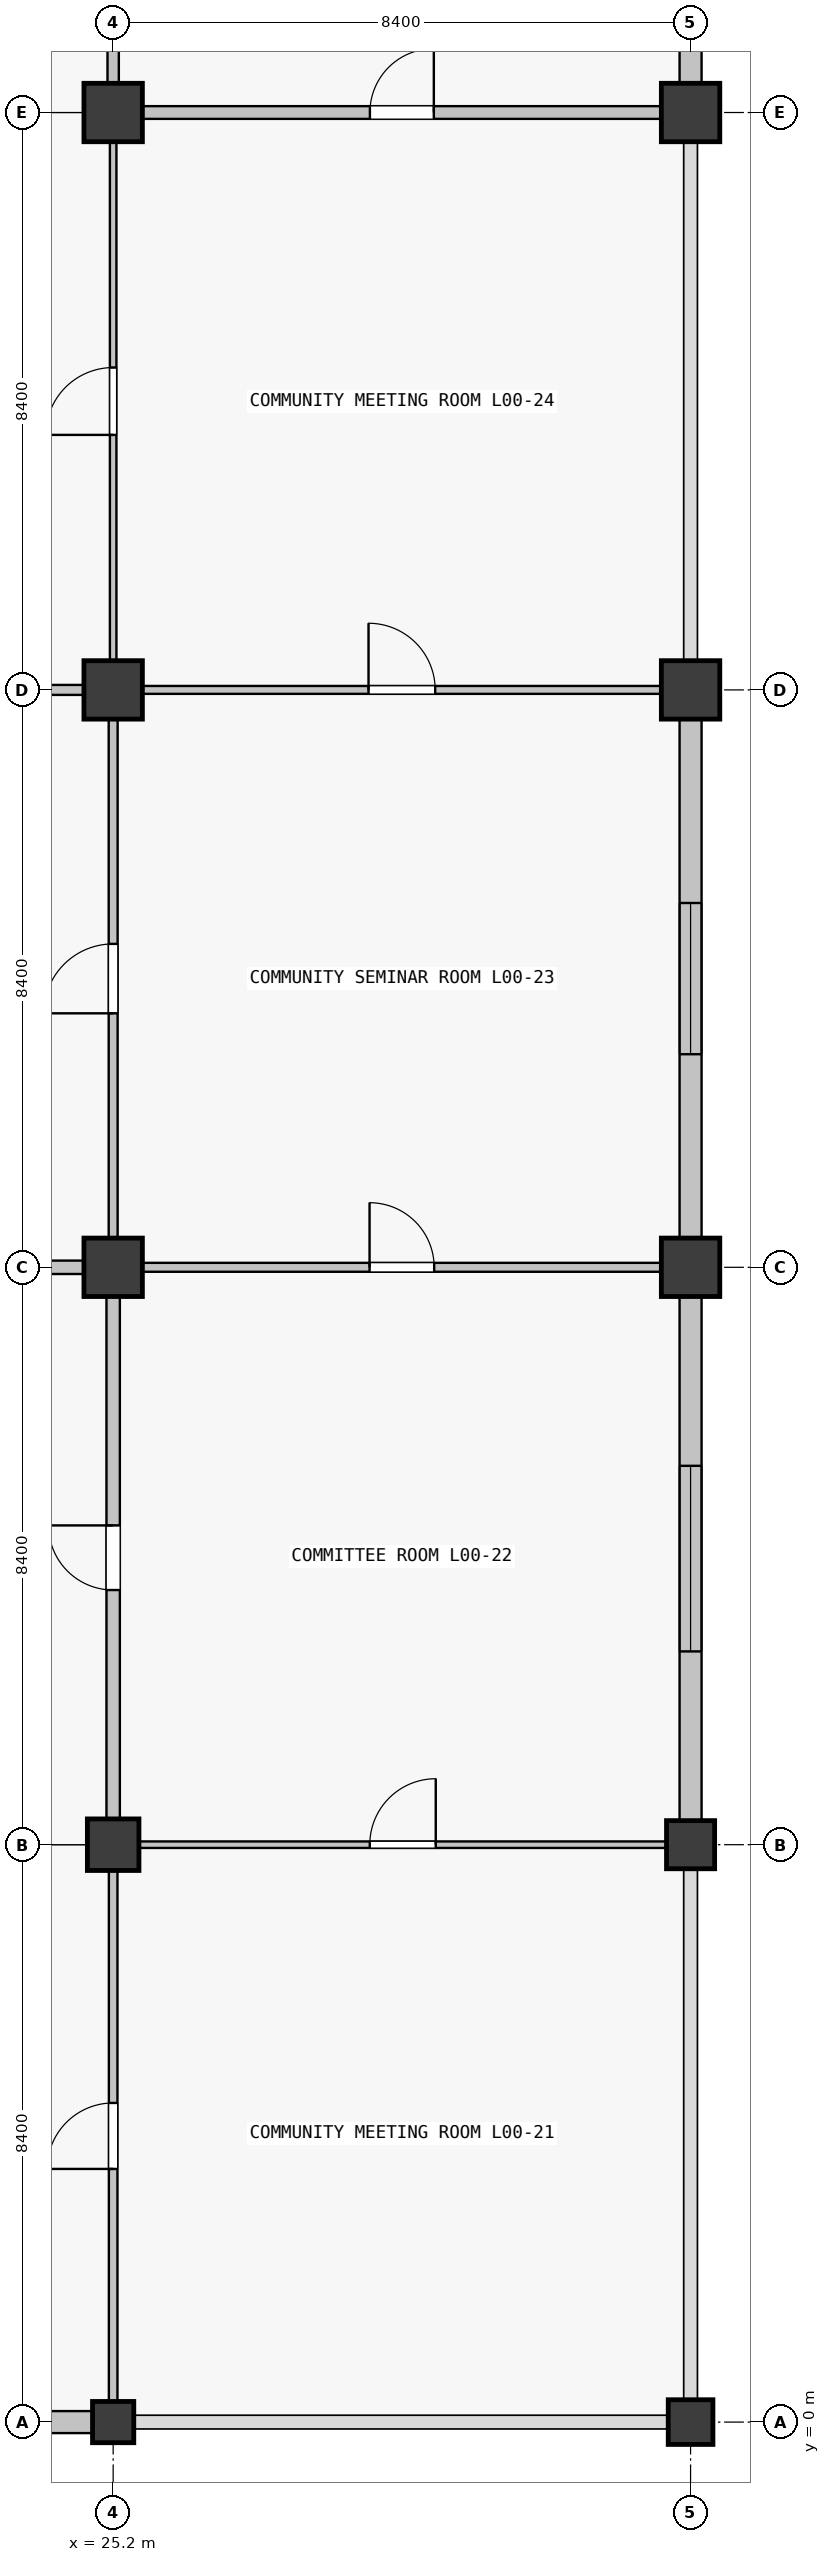
"""IFC4 building model, lengths in metres.
Left out: names, types, materials, properties, quantities, classifications, styles, units other than length and angle.
Written with IfcOpenShell. Run it as: python <this file> out.ifc"""

import sys

from ifc_helpers import new_model, si_unit, direction, frame, frame_2d, origin, origin_2d, place, context, subcontext, project, spatial, rectangle, extrude, element, fill, save


model = new_model("IFC4")
c1 = context("Model", 3, precision=1e-05, world=origin(), true_north=direction((0.0, 1.0)))
c2 = subcontext(c1, "Body", "Model", "MODEL_VIEW")
j1 = project(units=[si_unit("LENGTHUNIT", "METRE"), si_unit("PLANEANGLEUNIT", "RADIAN")], contexts=[c1])
p1 = place(None, origin())
s1 = spatial("IfcSite", under=j1, at=p1, CompositionType="ELEMENT")
p2 = place(p1, origin())
s2 = spatial("IfcBuilding", under=s1, at=p2, CompositionType="ELEMENT")
p3 = place(p2, origin())
s3 = spatial("IfcBuildingStorey", under=s2, at=p3, CompositionType="ELEMENT", Elevation=0.0)
p4 = place(p3, frame((25.2, 0.0, 0.0), z_axis=(0.0, 0.0, 1.0), x_axis=(1.0, 0.0, 0.0)))
e1 = element("IfcColumn", 1, at=p4, inside=s3, PredefinedType="COLUMN", context=c2, shape_type="SweptSolid", body=[
    extrude(rectangle(XDim=0.6, YDim=0.6, at=origin_2d()), origin(), (0.0, 0.0, 1.0), 5.76),
])
p5 = place(p3, frame((25.2, 8.4, 0.0), z_axis=(0.0, 0.0, 1.0), x_axis=(1.0, 0.0, 0.0)))
e2 = element("IfcColumn", 2, at=p5, inside=s3, PredefinedType="COLUMN", context=c2, shape_type="SweptSolid", body=[
    extrude(rectangle(XDim=0.75, YDim=0.75, at=origin_2d()), origin(), (0.0, 0.0, 1.0), 5.76),
])
for number, where, z_axis, x_axis in (
    (3, (25.2, 16.8, 0.0), (0.0, 0.0, 1.0), (1.0, 0.0, 0.0)),
    (4, (25.2, 25.2, 0.0), (0.0, 0.0, 1.0), (1.0, 0.0, 0.0)),
    (5, (25.2, 33.6, 0.0), (0.0, 0.0, 1.0), (1.0, 0.0, 0.0)),
):
    element("IfcColumn", number, at=place(p3, frame(where, z_axis=z_axis, x_axis=x_axis)), inside=s3, PredefinedType="COLUMN", context=c2, shape_type="SweptSolid", body=[
        extrude(rectangle(XDim=0.85, YDim=0.85, at=origin_2d()), origin(), (0.0, 0.0, 1.0), 5.76),
    ])
p6 = place(p3, frame((33.6, 0.0, 0.0), z_axis=(0.0, 0.0, 1.0), x_axis=(1.0, 0.0, 0.0)))
e6 = element("IfcColumn", 6, at=p6, inside=s3, PredefinedType="COLUMN", context=c2, shape_type="SweptSolid", body=[
    extrude(rectangle(XDim=0.65, YDim=0.65, at=origin_2d()), origin(), (0.0, 0.0, 1.0), 5.76),
])
p7 = place(p3, frame((33.6, 8.4, 0.0), z_axis=(0.0, 0.0, 1.0), x_axis=(1.0, 0.0, 0.0)))
e7 = element("IfcColumn", 7, at=p7, inside=s3, PredefinedType="COLUMN", context=c2, shape_type="SweptSolid", body=[
    extrude(rectangle(XDim=0.7, YDim=0.7, at=origin_2d()), origin(), (0.0, 0.0, 1.0), 5.76),
])
for number, where, z_axis, x_axis in (
    (8, (33.6, 16.8, 0.0), (0.0, 0.0, 1.0), (1.0, 0.0, 0.0)),
    (9, (33.6, 25.2, 0.0), (0.0, 0.0, 1.0), (1.0, 0.0, 0.0)),
    (10, (33.6, 33.6, 0.0), (0.0, 0.0, 1.0), (1.0, 0.0, 0.0)),
):
    element("IfcColumn", number, at=place(p3, frame(where, z_axis=z_axis, x_axis=x_axis)), inside=s3, PredefinedType="COLUMN", context=c2, shape_type="SweptSolid", body=[
        extrude(rectangle(XDim=0.85, YDim=0.85, at=origin_2d()), origin(), (0.0, 0.0, 1.0), 5.76),
    ])
p8 = place(p3, frame((24.899, 0.0, 0.0), z_axis=(0.0, 0.0, 1.0), x_axis=(-1.0, 0.0, 0.0)))
e11 = element("IfcWall", 11, at=p8, inside=s3, PredefinedType="SOLIDWALL", context=c2, shape_type="SweptSolid", body=[
    extrude(rectangle(XDim=7.773, YDim=0.32, at=frame_2d((3.886, 0.0))), origin(), (0.0, 0.0, 1.0), 4.7),
])
p9 = place(p8, frame((2.736, 0.0, 0.0)))
e12 = element("IfcOpeningElement", 12, at=p9, cuts=e11, PredefinedType="OPENING", context=c2, shape_type="SweptSolid", body=[
    extrude(rectangle(XDim=2.3, YDim=2.3, at=frame_2d((1.15, 1.15))), frame((0.0, 0.16, 0.0), z_axis=(0.0, -1.0, 0.0), x_axis=(1.0, 0.0, 0.0)), (0.0, 0.0, 1.0), 0.32),
])
p10 = place(p3, frame((33.6, 16.374, 0.0), z_axis=(0.0, 0.0, 1.0), x_axis=(0.0, -1.0, 0.0)))
e13 = element("IfcWall", 13, at=p10, inside=s3, PredefinedType="SOLIDWALL", context=c2, shape_type="SweptSolid", body=[
    extrude(rectangle(XDim=7.623, YDim=0.32, at=frame_2d((3.812, 0.0))), origin(), (0.0, 0.0, 1.0), 4.7),
])
p11 = place(p10, frame((2.462, 0.0, 0.9)))
e14 = element("IfcOpeningElement", 14, at=p11, cuts=e13, PredefinedType="OPENING", context=c2, shape_type="SweptSolid", body=[
    extrude(rectangle(XDim=2.7, YDim=1.2, at=frame_2d((1.35, 0.6))), frame((0.0, 0.16, 0.0), z_axis=(0.0, -1.0, 0.0), x_axis=(1.0, 0.0, 0.0)), (0.0, 0.0, 1.0), 0.32),
])
p12 = place(p3, frame((33.6, 24.774, 0.0), z_axis=(0.0, 0.0, 1.0), x_axis=(0.0, -1.0, 0.0)))
e15 = element("IfcWall", 15, at=p12, inside=s3, PredefinedType="SOLIDWALL", context=c2, shape_type="SweptSolid", body=[
    extrude(rectangle(XDim=7.548, YDim=0.32, at=frame_2d((3.774, 0.0))), origin(), (0.0, 0.0, 1.0), 4.7),
])
p13 = place(p12, frame((2.674, 0.0, 0.9)))
e16 = element("IfcOpeningElement", 16, at=p13, cuts=e15, PredefinedType="OPENING", context=c2, shape_type="SweptSolid", body=[
    extrude(rectangle(XDim=2.2, YDim=1.35, at=frame_2d((1.1, 0.675))), frame((0.0, 0.16, 0.0), z_axis=(0.0, -1.0, 0.0), x_axis=(1.0, 0.0, 0.0)), (0.0, 0.0, 1.0), 0.32),
])
p14 = place(p3, frame((33.6, 41.574, 0.0), z_axis=(0.0, 0.0, 1.0), x_axis=(0.0, -1.0, 0.0)))
e17 = element("IfcWall", 17, at=p14, inside=s3, PredefinedType="SOLIDWALL", context=c2, shape_type="SweptSolid", body=[
    extrude(rectangle(XDim=7.548, YDim=0.32, at=frame_2d((3.774, 0.0))), origin(), (0.0, 0.0, 1.0), 4.7),
])
p15 = place(p14, frame((2.874, 0.0, 0.9)))
e18 = element("IfcOpeningElement", 18, at=p15, cuts=e17, PredefinedType="OPENING", context=c2, shape_type="SweptSolid", body=[
    extrude(rectangle(XDim=1.8, YDim=1.35, at=frame_2d((0.9, 0.675))), frame((0.0, 0.16, 0.0), z_axis=(0.0, -1.0, 0.0), x_axis=(1.0, 0.0, 0.0)), (0.0, 0.0, 1.0), 0.32),
])
p16 = place(p3, frame((17.227, 16.8, 0.0), z_axis=(0.0, 0.0, 1.0), x_axis=(1.0, 0.0, 0.0)))
e19 = element("IfcWall", 19, at=p16, inside=s3, PredefinedType="PARTITIONING", context=c2, shape_type="SweptSolid", body=[
    extrude(rectangle(XDim=7.546, YDim=0.195, at=frame_2d((3.773, 0.0))), origin(), (0.0, 0.0, 1.0), 3.66),
])
p17 = place(p16, frame((3.283, 0.0, 0.0)))
e20 = element("IfcOpeningElement", 20, at=p17, cuts=e19, PredefinedType="OPENING", context=c2, shape_type="SweptSolid", body=[
    extrude(rectangle(XDim=0.98, YDim=2.18, at=frame_2d((0.49, 1.09))), frame((0.0, 0.098, 0.0), z_axis=(0.0, -1.0, 0.0), x_axis=(1.0, 0.0, 0.0)), (0.0, 0.0, 1.0), 0.195),
])
p18 = place(p3, frame((17.227, 25.2, 0.0), z_axis=(0.0, 0.0, 1.0), x_axis=(1.0, 0.0, 0.0)))
e21 = element("IfcWall", 21, at=p18, inside=s3, PredefinedType="PARTITIONING", context=c2, shape_type="SweptSolid", body=[
    extrude(rectangle(XDim=7.546, YDim=0.145, at=frame_2d((3.773, 0.0))), origin(), (0.0, 0.0, 1.0), 3.66),
])
p19 = place(p18, frame((3.273, 0.0, 0.0)))
e22 = element("IfcOpeningElement", 22, at=p19, cuts=e21, PredefinedType="OPENING", context=c2, shape_type="SweptSolid", body=[
    extrude(rectangle(XDim=1.0, YDim=2.2, at=frame_2d((0.5, 1.1))), frame((0.0, 0.073, 0.0), z_axis=(0.0, -1.0, 0.0), x_axis=(1.0, 0.0, 0.0)), (0.0, 0.0, 1.0), 0.145),
])
p20 = place(p3, frame((25.577, 8.4, 0.0), z_axis=(0.0, 0.0, 1.0), x_axis=(1.0, 0.0, 0.0)))
e23 = element("IfcWall", 23, at=p20, inside=s3, PredefinedType="PARTITIONING", context=c2, shape_type="SweptSolid", body=[
    extrude(rectangle(XDim=7.671, YDim=0.095, at=frame_2d((3.835, 0.0))), origin(), (0.0, 0.0, 1.0), 3.66),
])
p21 = place(p20, frame((3.356, 0.0, 0.0)))
e24 = element("IfcOpeningElement", 24, at=p21, cuts=e23, PredefinedType="OPENING", context=c2, shape_type="SweptSolid", body=[
    extrude(rectangle(XDim=0.96, YDim=2.18, at=frame_2d((0.48, 1.09))), frame((0.0, 0.047, 0.0), z_axis=(0.0, -1.0, 0.0), x_axis=(1.0, 0.0, 0.0)), (0.0, 0.0, 1.0), 0.095),
])
p22 = place(p3, frame((25.627, 16.8, 0.0), z_axis=(0.0, 0.0, 1.0), x_axis=(1.0, 0.0, 0.0)))
e25 = element("IfcWall", 25, at=p22, inside=s3, PredefinedType="MOVABLE", context=c2, shape_type="SweptSolid", body=[
    extrude(rectangle(XDim=7.546, YDim=0.13, at=frame_2d((3.773, 0.0))), origin(), (0.0, 0.0, 1.0), 3.66),
])
p23 = place(p22, frame((3.303, 0.0, 0.0)))
e26 = element("IfcOpeningElement", 26, at=p23, cuts=e25, PredefinedType="OPENING", context=c2, shape_type="SweptSolid", body=[
    extrude(rectangle(XDim=0.94, YDim=2.15, at=frame_2d((0.47, 1.075))), frame((0.0, 0.065, 0.0), z_axis=(0.0, -1.0, 0.0), x_axis=(1.0, 0.0, 0.0)), (0.0, 0.0, 1.0), 0.13),
])
p24 = place(p3, frame((25.627, 25.2, 0.0), z_axis=(0.0, 0.0, 1.0), x_axis=(1.0, 0.0, 0.0)))
e27 = element("IfcWall", 27, at=p24, inside=s3, PredefinedType="PARTITIONING", context=c2, shape_type="SweptSolid", body=[
    extrude(rectangle(XDim=7.546, YDim=0.115, at=frame_2d((3.773, 0.0))), origin(), (0.0, 0.0, 1.0), 3.66),
])
p25 = place(p24, frame((3.288, 0.0, 0.0)))
e28 = element("IfcOpeningElement", 28, at=p25, cuts=e27, PredefinedType="OPENING", context=c2, shape_type="SweptSolid", body=[
    extrude(rectangle(XDim=0.97, YDim=2.12, at=frame_2d((0.485, 1.06))), frame((0.0, 0.058, 0.0), z_axis=(0.0, -1.0, 0.0), x_axis=(1.0, 0.0, 0.0)), (0.0, 0.0, 1.0), 0.115),
])
p26 = place(p3, frame((25.627, 33.6, 0.0), z_axis=(0.0, 0.0, 1.0), x_axis=(1.0, 0.0, 0.0)))
e29 = element("IfcWall", 29, at=p26, inside=s3, PredefinedType="PARTITIONING", context=c2, shape_type="SweptSolid", body=[
    extrude(rectangle(XDim=7.546, YDim=0.185, at=frame_2d((3.773, 0.0))), origin(), (0.0, 0.0, 1.0), 3.66),
])
p27 = place(p26, frame((3.308, 0.0, 0.0)))
e30 = element("IfcOpeningElement", 30, at=p27, cuts=e29, PredefinedType="OPENING", context=c2, shape_type="SweptSolid", body=[
    extrude(rectangle(XDim=0.93, YDim=2.12, at=frame_2d((0.465, 1.06))), frame((0.0, 0.093, 0.0), z_axis=(0.0, -1.0, 0.0), x_axis=(1.0, 0.0, 0.0)), (0.0, 0.0, 1.0), 0.185),
])
p28 = place(p3, frame((25.2, 0.302, 0.0), z_axis=(0.0, 0.0, 1.0), x_axis=(0.0, 1.0, 0.0)))
e31 = element("IfcWall", 31, at=p28, inside=s3, PredefinedType="PARTITIONING", context=c2, shape_type="SweptSolid", body=[
    extrude(rectangle(XDim=7.721, YDim=0.125, at=frame_2d((3.86, 0.0))), origin(), (0.0, 0.0, 1.0), 3.66),
])
p29 = place(p28, frame((3.381, 0.0, 0.0)))
e32 = element("IfcOpeningElement", 32, at=p29, cuts=e31, PredefinedType="OPENING", context=c2, shape_type="SweptSolid", body=[
    extrude(rectangle(XDim=0.96, YDim=2.18, at=frame_2d((0.48, 1.09))), frame((0.0, 0.062, 0.0), z_axis=(0.0, -1.0, 0.0), x_axis=(1.0, 0.0, 0.0)), (0.0, 0.0, 1.0), 0.125),
])
p30 = place(p3, frame((25.2, 8.777, 0.0), z_axis=(0.0, 0.0, 1.0), x_axis=(0.0, 1.0, 0.0)))
e33 = element("IfcWall", 33, at=p30, inside=s3, PredefinedType="PARTITIONING", context=c2, shape_type="SweptSolid", body=[
    extrude(rectangle(XDim=7.596, YDim=0.195, at=frame_2d((3.798, 0.0))), origin(), (0.0, 0.0, 1.0), 3.66),
])
p31 = place(p30, frame((3.328, 0.0, 0.0)))
e34 = element("IfcOpeningElement", 34, at=p31, cuts=e33, PredefinedType="OPENING", context=c2, shape_type="SweptSolid", body=[
    extrude(rectangle(XDim=0.94, YDim=2.15, at=frame_2d((0.47, 1.075))), frame((0.0, 0.098, 0.0), z_axis=(0.0, -1.0, 0.0), x_axis=(1.0, 0.0, 0.0)), (0.0, 0.0, 1.0), 0.195),
])
p32 = place(p3, frame((25.2, 17.227, 0.0), z_axis=(0.0, 0.0, 1.0), x_axis=(0.0, 1.0, 0.0)))
e35 = element("IfcWall", 35, at=p32, inside=s3, PredefinedType="MOVABLE", context=c2, shape_type="SweptSolid", body=[
    extrude(rectangle(XDim=7.546, YDim=0.13, at=frame_2d((3.773, 0.0))), origin(), (0.0, 0.0, 1.0), 3.66),
])
p33 = place(p32, frame((3.268, 0.0, 0.0)))
e36 = element("IfcOpeningElement", 36, at=p33, cuts=e35, PredefinedType="OPENING", context=c2, shape_type="SweptSolid", body=[
    extrude(rectangle(XDim=1.01, YDim=2.12, at=frame_2d((0.505, 1.06))), frame((0.0, 0.065, 0.0), z_axis=(0.0, -1.0, 0.0), x_axis=(1.0, 0.0, 0.0)), (0.0, 0.0, 1.0), 0.13),
])
p34 = place(p3, frame((25.2, 25.627, 0.0), z_axis=(0.0, 0.0, 1.0), x_axis=(0.0, 1.0, 0.0)))
e37 = element("IfcWall", 37, at=p34, inside=s3, PredefinedType="PARTITIONING", context=c2, shape_type="SweptSolid", body=[
    extrude(rectangle(XDim=7.546, YDim=0.095, at=frame_2d((3.773, 0.0))), origin(), (0.0, 0.0, 1.0), 3.66),
])
p35 = place(p34, frame((3.283, 0.0, 0.0)))
e38 = element("IfcOpeningElement", 38, at=p35, cuts=e37, PredefinedType="OPENING", context=c2, shape_type="SweptSolid", body=[
    extrude(rectangle(XDim=0.98, YDim=2.18, at=frame_2d((0.49, 1.09))), frame((0.0, 0.047, 0.0), z_axis=(0.0, -1.0, 0.0), x_axis=(1.0, 0.0, 0.0)), (0.0, 0.0, 1.0), 0.095),
])
p36 = place(p3, frame((25.2, 34.027, 0.0), z_axis=(0.0, 0.0, 1.0), x_axis=(0.0, 1.0, 0.0)))
e39 = element("IfcWall", 39, at=p36, inside=s3, PredefinedType="PARTITIONING", context=c2, shape_type="SweptSolid", body=[
    extrude(rectangle(XDim=7.546, YDim=0.165, at=frame_2d((3.773, 0.0))), origin(), (0.0, 0.0, 1.0), 3.66),
])
p37 = place(p36, frame((3.293, 0.0, 0.0)))
e40 = element("IfcOpeningElement", 40, at=p37, cuts=e39, PredefinedType="OPENING", context=c2, shape_type="SweptSolid", body=[
    extrude(rectangle(XDim=0.96, YDim=2.18, at=frame_2d((0.48, 1.09))), frame((0.0, 0.083, 0.0), z_axis=(0.0, -1.0, 0.0), x_axis=(1.0, 0.0, 0.0)), (0.0, 0.0, 1.0), 0.165),
])
p38 = place(p11, origin())
e41 = element("IfcWindow", 41, at=p38, inside=s3, PartitioningType="SINGLE_PANEL", PredefinedType="WINDOW", context=c2, shape_type="SweptSolid", body=[
    extrude(rectangle(XDim=2.7, YDim=1.2, at=frame_2d((1.35, 0.6))), frame((0.0, 0.03, 0.0), z_axis=(0.0, -1.0, 0.0), x_axis=(1.0, 0.0, 0.0)), (0.0, 0.0, 1.0), 0.06),
])
fill(e14, e41)
p39 = place(p13, origin())
e42 = element("IfcWindow", 42, at=p39, inside=s3, PartitioningType="SINGLE_PANEL", PredefinedType="WINDOW", context=c2, shape_type="SweptSolid", body=[
    extrude(rectangle(XDim=2.2, YDim=1.35, at=frame_2d((1.1, 0.675))), frame((0.0, 0.03, 0.0), z_axis=(0.0, -1.0, 0.0), x_axis=(1.0, 0.0, 0.0)), (0.0, 0.0, 1.0), 0.06),
])
fill(e16, e42)
p40 = place(p35, origin())
e43 = element("IfcDoor", 43, at=p40, inside=s3, OperationType="SINGLE_SWING_LEFT", PredefinedType="DOOR", context=c2, shape_type="SweptSolid", body=[
    extrude(rectangle(XDim=0.98, YDim=2.18, at=frame_2d((0.49, 1.09))), frame((0.0, 0.025, 0.0), z_axis=(0.0, -1.0, 0.0), x_axis=(1.0, 0.0, 0.0)), (0.0, 0.0, 1.0), 0.05),
])
fill(e38, e43)
p41 = place(p21, origin())
e44 = element("IfcDoor", 44, at=p41, inside=s3, OperationType="SINGLE_SWING_RIGHT", PredefinedType="DOOR", context=c2, shape_type="SweptSolid", body=[
    extrude(rectangle(XDim=0.96, YDim=2.18, at=frame_2d((0.48, 1.09))), frame((0.0, 0.025, 0.0), z_axis=(0.0, -1.0, 0.0), x_axis=(1.0, 0.0, 0.0)), (0.0, 0.0, 1.0), 0.05),
])
fill(e24, e44)
p42 = place(p23, origin())
e45 = element("IfcDoor", 45, at=p42, inside=s3, OperationType="SINGLE_SWING_LEFT", PredefinedType="DOOR", context=c2, shape_type="SweptSolid", body=[
    extrude(rectangle(XDim=0.94, YDim=2.15, at=frame_2d((0.47, 1.075))), frame((0.0, 0.025, 0.0), z_axis=(0.0, -1.0, 0.0), x_axis=(1.0, 0.0, 0.0)), (0.0, 0.0, 1.0), 0.05),
])
fill(e26, e45)
p43 = place(p29, origin())
e46 = element("IfcDoor", 46, at=p43, inside=s3, OperationType="SINGLE_SWING_LEFT", PredefinedType="DOOR", context=c2, shape_type="SweptSolid", body=[
    extrude(rectangle(XDim=0.96, YDim=2.18, at=frame_2d((0.48, 1.09))), frame((0.0, 0.025, 0.0), z_axis=(0.0, -1.0, 0.0), x_axis=(1.0, 0.0, 0.0)), (0.0, 0.0, 1.0), 0.05),
])
fill(e32, e46)
p44 = place(p31, origin())
e47 = element("IfcDoor", 47, at=p44, inside=s3, OperationType="SINGLE_SWING_RIGHT", PredefinedType="DOOR", context=c2, shape_type="SweptSolid", body=[
    extrude(rectangle(XDim=0.94, YDim=2.15, at=frame_2d((0.47, 1.075))), frame((0.0, 0.025, 0.0), z_axis=(0.0, -1.0, 0.0), x_axis=(1.0, 0.0, 0.0)), (0.0, 0.0, 1.0), 0.05),
])
fill(e34, e47)
p45 = place(p25, origin())
e48 = element("IfcDoor", 48, at=p45, inside=s3, OperationType="SINGLE_SWING_LEFT", PredefinedType="DOOR", context=c2, shape_type="SweptSolid", body=[
    extrude(rectangle(XDim=0.97, YDim=2.12, at=frame_2d((0.485, 1.06))), frame((0.0, 0.025, 0.0), z_axis=(0.0, -1.0, 0.0), x_axis=(1.0, 0.0, 0.0)), (0.0, 0.0, 1.0), 0.05),
])
fill(e28, e48)
p46 = place(p27, origin())
e49 = element("IfcDoor", 49, at=p46, inside=s3, OperationType="SINGLE_SWING_RIGHT", PredefinedType="DOOR", context=c2, shape_type="SweptSolid", body=[
    extrude(rectangle(XDim=0.93, YDim=2.12, at=frame_2d((0.465, 1.06))), frame((0.0, 0.025, 0.0), z_axis=(0.0, -1.0, 0.0), x_axis=(1.0, 0.0, 0.0)), (0.0, 0.0, 1.0), 0.05),
])
fill(e30, e49)
p47 = place(p33, origin())
e50 = element("IfcDoor", 50, at=p47, inside=s3, OperationType="SINGLE_SWING_LEFT", PredefinedType="DOOR", context=c2, shape_type="SweptSolid", body=[
    extrude(rectangle(XDim=1.01, YDim=2.12, at=frame_2d((0.505, 1.06))), frame((0.0, 0.025, 0.0), z_axis=(0.0, -1.0, 0.0), x_axis=(1.0, 0.0, 0.0)), (0.0, 0.0, 1.0), 0.05),
])
fill(e36, e50)
save(model, sys.argv[1])
